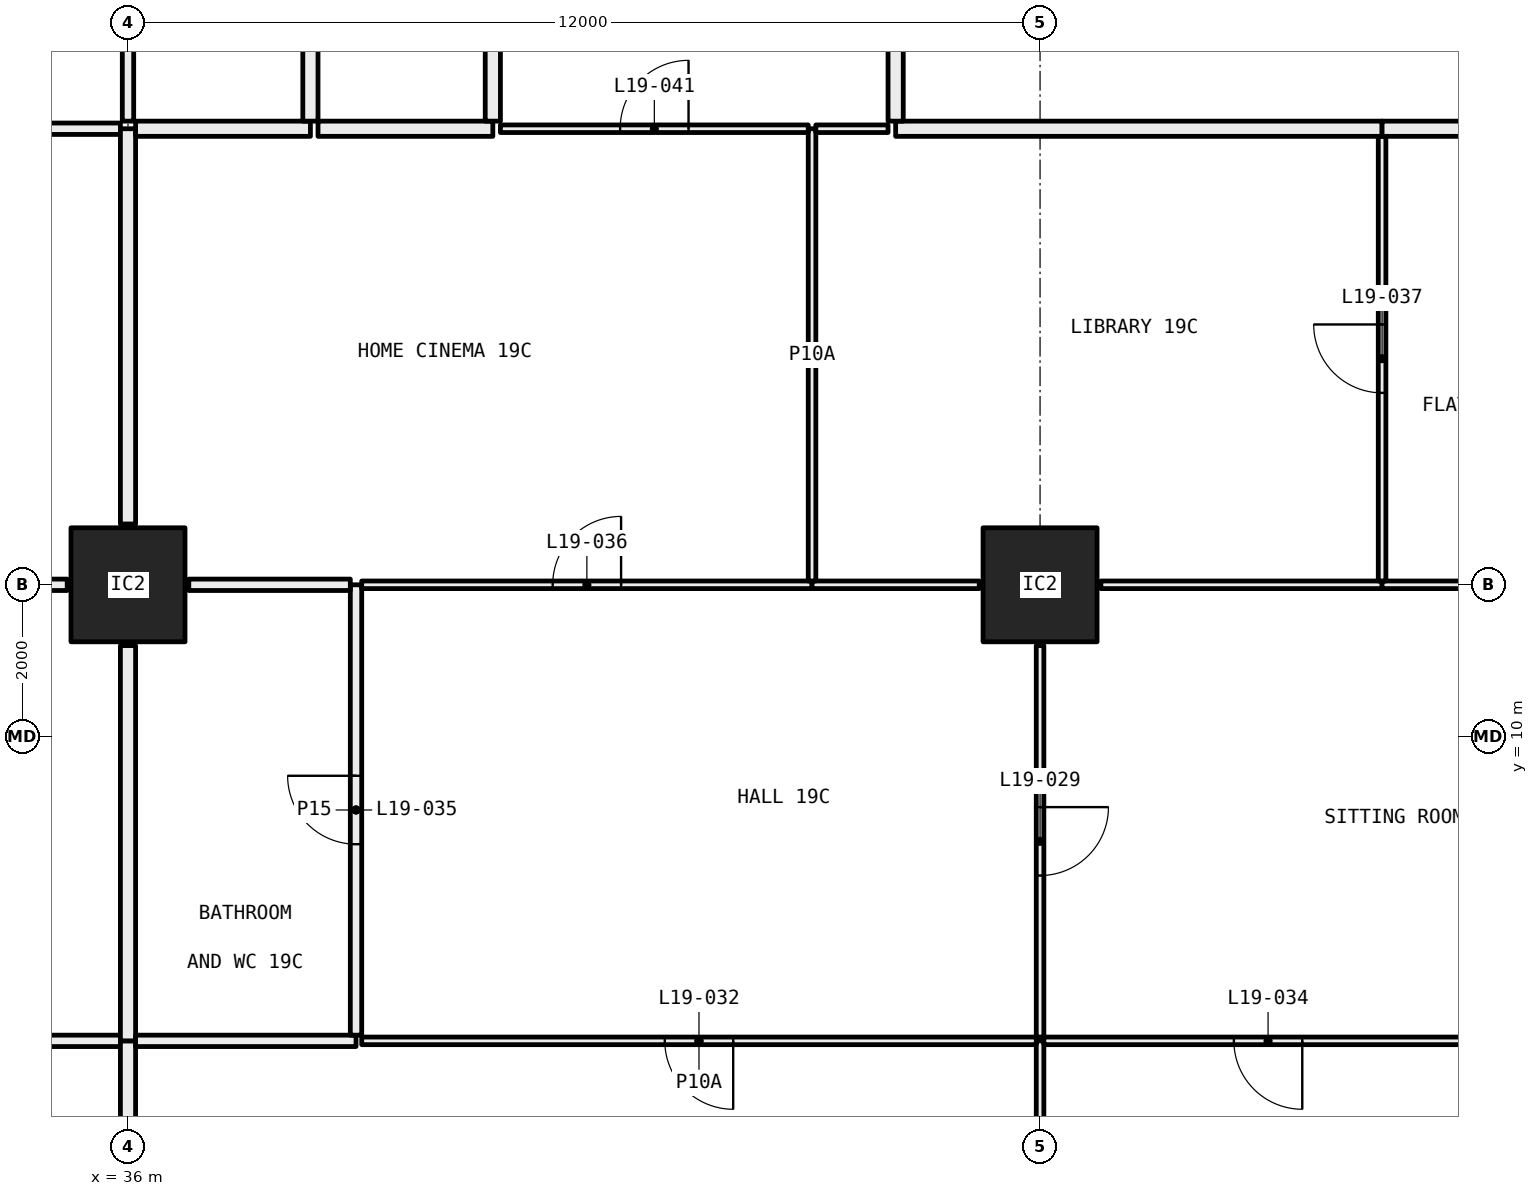
"""IFC4 building model, lengths in metres.
Left out: names, types, materials, properties, quantities, classifications, styles, units other than length and angle.
Written with IfcOpenShell. Run it as: python <this file> out.ifc"""

import sys

from ifc_helpers import new_model, si_unit, direction, frame, frame_2d, origin, origin_2d, place, context, subcontext, project, spatial, rectangle, hollow_rectangle, extrude, element, fill, save


model = new_model("IFC4")
c1 = context("Model", 3, precision=1e-05, world=origin(), true_north=direction((0.0, 1.0)))
c2 = subcontext(c1, "Body", "Model", "MODEL_VIEW")
j1 = project(units=[si_unit("LENGTHUNIT", "METRE"), si_unit("PLANEANGLEUNIT", "RADIAN")], contexts=[c1])
p1 = place(None, origin())
s1 = spatial("IfcSite", under=j1, at=p1, CompositionType="ELEMENT")
p2 = place(p1, origin())
s2 = spatial("IfcBuilding", under=s1, at=p2, CompositionType="ELEMENT")
p3 = place(p2, frame((0.0, 0.0, 78.3)))
s3 = spatial("IfcBuildingStorey", under=s2, at=p3, CompositionType="ELEMENT", Elevation=78.3)
for number, where, z_axis, x_axis in (
    (1, (36.0, 12.0, 0.0), (0.0, 0.0, 1.0), (1.0, 0.0, 0.0)),
    (2, (48.0, 12.0, 0.0), (0.0, 0.0, 1.0), (1.0, 0.0, 0.0)),
):
    element("IfcColumn", number, at=place(p3, frame(where, z_axis=z_axis, x_axis=x_axis)), inside=s3, PredefinedType="COLUMN", context=c2, shape_type="SweptSolid", body=[
        extrude(hollow_rectangle(XDim=1.5, YDim=1.5, WallThickness=0.065, at=origin_2d()), origin(), (0.0, 0.0, 1.0), 3.05),
    ])
p4 = place(p3, frame((35.9, 6.0, 0.0), z_axis=(0.0, 0.0, 1.0), x_axis=(-1.0, 0.0, 0.0)))
e3 = element("IfcWall", 3, at=p4, inside=s3, PredefinedType="PARTITIONING", context=c2, shape_type="SweptSolid", body=[
    extrude(rectangle(XDim=2.9, YDim=0.15, at=frame_2d((1.45, 0.0))), origin(), (0.0, 0.0, 1.0), 3.05),
])
p5 = place(p3, frame((36.0, 0.72, 0.0), z_axis=(0.0, 0.0, 1.0), x_axis=(0.0, 1.0, 0.0)))
e4 = element("IfcWall", 4, at=p5, inside=s3, PredefinedType="PARTITIONING", context=c2, shape_type="SweptSolid", body=[
    extrude(rectangle(XDim=5.28, YDim=0.2, at=frame_2d((2.64, 0.0))), origin(), (0.0, 0.0, 1.0), 2.45),
])
p6 = place(p3, frame((35.2, 12.0, 0.0), z_axis=(0.0, 0.0, 1.0), x_axis=(-1.0, 0.0, 0.0)))
e5 = element("IfcWall", 5, at=p6, inside=s3, PredefinedType="PARTITIONING", context=c2, shape_type="SweptSolid", body=[
    extrude(rectangle(XDim=2.125, YDim=0.15, at=frame_2d((1.062, 0.0))), origin(), (0.0, 0.0, 1.0), 2.45),
])
p7 = place(p3, frame((36.0, 6.0, 0.0), z_axis=(0.0, 0.0, 1.0), x_axis=(0.0, 1.0, 0.0)))
e6 = element("IfcWall", 6, at=p7, inside=s3, PredefinedType="PARTITIONING", context=c2, shape_type="SweptSolid", body=[
    extrude(rectangle(XDim=5.2, YDim=0.2, at=frame_2d((2.6, 0.0))), origin(), (0.0, 0.0, 1.0), 2.45),
])
p8 = place(p3, frame((35.9, 18.0, 0.0), z_axis=(0.0, 0.0, 1.0), x_axis=(-1.0, 0.0, 0.0)))
e7 = element("IfcWall", 7, at=p8, inside=s3, PredefinedType="PARTITIONING", context=c2, shape_type="SweptSolid", body=[
    extrude(rectangle(XDim=4.4, YDim=0.15, at=frame_2d((2.2, 0.0))), origin(), (0.0, 0.0, 1.0), 3.05),
])
p9 = place(p3, frame((36.0, 12.8, 0.0), z_axis=(0.0, 0.0, 1.0), x_axis=(0.0, 1.0, 0.0)))
e8 = element("IfcWall", 8, at=p9, inside=s3, PredefinedType="PARTITIONING", context=c2, shape_type="SweptSolid", body=[
    extrude(rectangle(XDim=5.2, YDim=0.2, at=frame_2d((2.6, 0.0))), origin(), (0.0, 0.0, 1.0), 2.45),
])
p10 = place(p3, frame((36.0, 18.1, 0.0), z_axis=(0.0, 0.0, 1.0), x_axis=(0.0, 1.0, 0.0)))
e9 = element("IfcWall", 9, at=p10, inside=s3, PredefinedType="PARTITIONING", context=c2, shape_type="SweptSolid", body=[
    extrude(rectangle(XDim=5.1, YDim=0.15, at=frame_2d((2.55, 0.0))), origin(), (0.0, 0.0, 1.0), 2.45),
])
p11 = place(p10, frame((2.1, 0.0, 0.0)))
e10 = element("IfcOpeningElement", 10, at=p11, cuts=e9, PredefinedType="OPENING", context=c2, shape_type="SweptSolid", body=[
    extrude(rectangle(XDim=0.9, YDim=2.1, at=frame_2d((0.45, 1.05))), frame((0.0, 0.085, 0.0), z_axis=(0.0, -1.0, 0.0), x_axis=(1.0, 0.0, 0.0)), (0.0, 0.0, 1.0), 0.17),
])
p12 = place(p3, frame((36.1, 18.0, 0.0), z_axis=(0.0, 0.0, 1.0), x_axis=(1.0, 0.0, 0.0)))
e11 = element("IfcWall", 11, at=p12, inside=s3, PredefinedType="PARTITIONING", context=c2, shape_type="SweptSolid", body=[
    extrude(rectangle(XDim=2.3, YDim=0.2, at=frame_2d((1.15, 0.0))), origin(), (0.0, 0.0, 1.0), 3.05),
])
p13 = place(p3, frame((38.4, 18.1, 0.0), z_axis=(0.0, 0.0, 1.0), x_axis=(0.0, 1.0, 0.0)))
e12 = element("IfcWall", 12, at=p13, inside=s3, PredefinedType="PARTITIONING", context=c2, shape_type="SweptSolid", body=[
    extrude(rectangle(XDim=6.2, YDim=0.2, at=frame_2d((3.1, 0.0))), origin(), (0.0, 0.0, 1.0), 2.45),
])
p14 = place(p3, frame((48.0, 0.72, 0.0), z_axis=(0.0, 0.0, 1.0), x_axis=(0.0, 1.0, 0.0)))
e13 = element("IfcWall", 13, at=p14, inside=s3, PredefinedType="PARTITIONING", context=c2, shape_type="SweptSolid", body=[
    extrude(rectangle(XDim=5.28, YDim=0.1, at=frame_2d((2.64, 0.0))), origin(), (0.0, 0.0, 1.0), 2.45),
])
p15 = place(p3, frame((39.0, 6.0, 0.0), z_axis=(0.0, 0.0, 1.0), x_axis=(-1.0, 0.0, 0.0)))
e14 = element("IfcWall", 14, at=p15, inside=s3, PredefinedType="PARTITIONING", context=c2, shape_type="SweptSolid", body=[
    extrude(rectangle(XDim=2.9, YDim=0.15, at=frame_2d((1.45, 0.0))), origin(), (0.0, 0.0, 1.0), 3.05),
])
p16 = place(p3, frame((47.95, 6.0, 0.0), z_axis=(0.0, 0.0, 1.0), x_axis=(-1.0, 0.0, 0.0)))
e15 = element("IfcWall", 15, at=p16, inside=s3, PredefinedType="PARTITIONING", context=c2, shape_type="SweptSolid", body=[
    extrude(rectangle(XDim=8.875, YDim=0.1, at=frame_2d((4.438, 0.0))), origin(), (0.0, 0.0, 1.0), 2.45),
])
p17 = place(p16, frame((3.988, 0.0, 0.0)))
e16 = element("IfcOpeningElement", 16, at=p17, cuts=e15, PredefinedType="OPENING", context=c2, shape_type="SweptSolid", body=[
    extrude(rectangle(XDim=0.9, YDim=2.1, at=frame_2d((0.45, 1.05))), frame((0.0, 0.06, 0.0), z_axis=(0.0, -1.0, 0.0), x_axis=(1.0, 0.0, 0.0)), (0.0, 0.0, 1.0), 0.12),
])
p18 = place(p3, frame((53.95, 6.0, 0.0), z_axis=(0.0, 0.0, 1.0), x_axis=(-1.0, 0.0, 0.0)))
e17 = element("IfcWall", 17, at=p18, inside=s3, PredefinedType="PARTITIONING", context=c2, shape_type="SweptSolid", body=[
    extrude(rectangle(XDim=5.9, YDim=0.1, at=frame_2d((2.95, 0.0))), origin(), (0.0, 0.0, 1.0), 2.45),
])
p19 = place(p18, frame((2.5, 0.0, 0.0)))
e18 = element("IfcOpeningElement", 18, at=p19, cuts=e17, PredefinedType="OPENING", context=c2, shape_type="SweptSolid", body=[
    extrude(rectangle(XDim=0.9, YDim=2.1, at=frame_2d((0.45, 1.05))), frame((0.0, 0.06, 0.0), z_axis=(0.0, -1.0, 0.0), x_axis=(1.0, 0.0, 0.0)), (0.0, 0.0, 1.0), 0.12),
])
p20 = place(p3, frame((39.0, 6.075, 0.0), z_axis=(0.0, 0.0, 1.0), x_axis=(0.0, 1.0, 0.0)))
e19 = element("IfcWall", 19, at=p20, inside=s3, PredefinedType="PARTITIONING", context=c2, shape_type="SweptSolid", body=[
    extrude(rectangle(XDim=5.925, YDim=0.15, at=frame_2d((2.962, 0.0))), origin(), (0.0, 0.0, 1.0), 2.45),
])
p21 = place(p20, frame((2.512, 0.0, 0.0)))
e20 = element("IfcOpeningElement", 20, at=p21, cuts=e19, PredefinedType="OPENING", context=c2, shape_type="SweptSolid", body=[
    extrude(rectangle(XDim=0.9, YDim=2.1, at=frame_2d((0.45, 1.05))), frame((0.0, 0.085, 0.0), z_axis=(0.0, -1.0, 0.0), x_axis=(1.0, 0.0, 0.0)), (0.0, 0.0, 1.0), 0.17),
])
p22 = place(p3, frame((38.925, 12.0, 0.0), z_axis=(0.0, 0.0, 1.0), x_axis=(-1.0, 0.0, 0.0)))
e21 = element("IfcWall", 21, at=p22, inside=s3, PredefinedType="PARTITIONING", context=c2, shape_type="SweptSolid", body=[
    extrude(rectangle(XDim=2.125, YDim=0.15, at=frame_2d((1.062, 0.0))), origin(), (0.0, 0.0, 1.0), 2.45),
])
p23 = place(p3, frame((48.0, 6.05, 0.0), z_axis=(0.0, 0.0, 1.0), x_axis=(0.0, 1.0, 0.0)))
e22 = element("IfcWall", 22, at=p23, inside=s3, PredefinedType="PARTITIONING", context=c2, shape_type="SweptSolid", body=[
    extrude(rectangle(XDim=5.15, YDim=0.1, at=frame_2d((2.575, 0.0))), origin(), (0.0, 0.0, 1.0), 2.45),
])
p24 = place(p23, frame((2.125, 0.0, 0.0)))
e23 = element("IfcOpeningElement", 23, at=p24, cuts=e22, PredefinedType="OPENING", context=c2, shape_type="SweptSolid", body=[
    extrude(rectangle(XDim=0.9, YDim=2.1, at=frame_2d((0.45, 1.05))), frame((0.0, 0.06, 0.0), z_axis=(0.0, -1.0, 0.0), x_axis=(1.0, 0.0, 0.0)), (0.0, 0.0, 1.0), 0.12),
])
p25 = place(p3, frame((45.0, 12.0, 0.0), z_axis=(0.0, 0.0, 1.0), x_axis=(-1.0, 0.0, 0.0)))
e24 = element("IfcWall", 24, at=p25, inside=s3, PredefinedType="PARTITIONING", context=c2, shape_type="SweptSolid", body=[
    extrude(rectangle(XDim=5.925, YDim=0.1, at=frame_2d((2.962, 0.0))), origin(), (0.0, 0.0, 1.0), 2.45),
])
p26 = place(p25, frame((2.512, 0.0, 0.0)))
e25 = element("IfcOpeningElement", 25, at=p26, cuts=e24, PredefinedType="OPENING", context=c2, shape_type="SweptSolid", body=[
    extrude(rectangle(XDim=0.9, YDim=2.1, at=frame_2d((0.45, 1.05))), frame((0.0, 0.06, 0.0), z_axis=(0.0, -1.0, 0.0), x_axis=(1.0, 0.0, 0.0)), (0.0, 0.0, 1.0), 0.12),
])
p27 = place(p3, frame((47.2, 12.0, 0.0), z_axis=(0.0, 0.0, 1.0), x_axis=(-1.0, 0.0, 0.0)))
e26 = element("IfcWall", 26, at=p27, inside=s3, PredefinedType="PARTITIONING", context=c2, shape_type="SweptSolid", body=[
    extrude(rectangle(XDim=2.2, YDim=0.1, at=frame_2d((1.1, 0.0))), origin(), (0.0, 0.0, 1.0), 2.45),
])
p28 = place(p3, frame((52.5, 12.0, 0.0), z_axis=(0.0, 0.0, 1.0), x_axis=(-1.0, 0.0, 0.0)))
e27 = element("IfcWall", 27, at=p28, inside=s3, PredefinedType="PARTITIONING", context=c2, shape_type="SweptSolid", body=[
    extrude(rectangle(XDim=3.7, YDim=0.1, at=frame_2d((1.85, 0.0))), origin(), (0.0, 0.0, 1.0), 2.45),
])
p29 = place(p3, frame((56.95, 12.0, 0.0), z_axis=(0.0, 0.0, 1.0), x_axis=(-1.0, 0.0, 0.0)))
e28 = element("IfcWall", 28, at=p29, inside=s3, PredefinedType="PARTITIONING", context=c2, shape_type="SweptSolid", body=[
    extrude(rectangle(XDim=4.45, YDim=0.1, at=frame_2d((2.225, 0.0))), origin(), (0.0, 0.0, 1.0), 2.45),
])
p30 = place(p29, frame((1.775, 0.0, 0.0)))
e29 = element("IfcOpeningElement", 29, at=p30, cuts=e28, PredefinedType="OPENING", context=c2, shape_type="SweptSolid", body=[
    extrude(rectangle(XDim=0.9, YDim=2.1, at=frame_2d((0.45, 1.05))), frame((0.0, 0.06, 0.0), z_axis=(0.0, -1.0, 0.0), x_axis=(1.0, 0.0, 0.0)), (0.0, 0.0, 1.0), 0.12),
])
p31 = place(p3, frame((45.0, 12.05, 0.0), z_axis=(0.0, 0.0, 1.0), x_axis=(0.0, 1.0, 0.0)))
e30 = element("IfcWall", 30, at=p31, inside=s3, PredefinedType="PARTITIONING", context=c2, shape_type="SweptSolid", body=[
    extrude(rectangle(XDim=5.95, YDim=0.1, at=frame_2d((2.975, 0.0))), origin(), (0.0, 0.0, 1.0), 2.45),
])
p32 = place(p3, frame((44.95, 18.0, 0.0), z_axis=(0.0, 0.0, 1.0), x_axis=(-1.0, 0.0, 0.0)))
e31 = element("IfcWall", 31, at=p32, inside=s3, PredefinedType="PARTITIONING", context=c2, shape_type="SweptSolid", body=[
    extrude(rectangle(XDim=4.05, YDim=0.1, at=frame_2d((2.025, 0.0))), origin(), (0.0, 0.0, 1.0), 3.05),
])
p33 = place(p32, frame((1.575, 0.0, 0.0)))
e32 = element("IfcOpeningElement", 32, at=p33, cuts=e31, PredefinedType="OPENING", context=c2, shape_type="SweptSolid", body=[
    extrude(rectangle(XDim=0.9, YDim=2.1, at=frame_2d((0.45, 1.05))), frame((0.0, 0.06, 0.0), z_axis=(0.0, -1.0, 0.0), x_axis=(1.0, 0.0, 0.0)), (0.0, 0.0, 1.0), 0.12),
])
p34 = place(p3, frame((40.8, 18.0, 0.0), z_axis=(0.0, 0.0, 1.0), x_axis=(-1.0, 0.0, 0.0)))
e33 = element("IfcWall", 33, at=p34, inside=s3, PredefinedType="PARTITIONING", context=c2, shape_type="SweptSolid", body=[
    extrude(rectangle(XDim=2.3, YDim=0.2, at=frame_2d((1.15, 0.0))), origin(), (0.0, 0.0, 1.0), 3.05),
])
p35 = place(p3, frame((52.5, 12.05, 0.0), z_axis=(0.0, 0.0, 1.0), x_axis=(0.0, 1.0, 0.0)))
e34 = element("IfcWall", 34, at=p35, inside=s3, PredefinedType="PARTITIONING", context=c2, shape_type="SweptSolid", body=[
    extrude(rectangle(XDim=5.85, YDim=0.1, at=frame_2d((2.925, 0.0))), origin(), (0.0, 0.0, 1.0), 2.45),
])
p36 = place(p35, frame((2.475, 0.0, 0.0)))
e35 = element("IfcOpeningElement", 35, at=p36, cuts=e34, PredefinedType="OPENING", context=c2, shape_type="SweptSolid", body=[
    extrude(rectangle(XDim=0.9, YDim=2.1, at=frame_2d((0.45, 1.05))), frame((0.0, 0.06, 0.0), z_axis=(0.0, -1.0, 0.0), x_axis=(1.0, 0.0, 0.0)), (0.0, 0.0, 1.0), 0.12),
])
p37 = place(p3, frame((46.0, 18.0, 0.0), z_axis=(0.0, 0.0, 1.0), x_axis=(-1.0, 0.0, 0.0)))
e36 = element("IfcWall", 36, at=p37, inside=s3, PredefinedType="PARTITIONING", context=c2, shape_type="SweptSolid", body=[
    extrude(rectangle(XDim=0.95, YDim=0.1, at=frame_2d((0.475, 0.0))), origin(), (0.0, 0.0, 1.0), 3.05),
])
p38 = place(p3, frame((52.5, 18.0, 0.0), z_axis=(0.0, 0.0, 1.0), x_axis=(-1.0, 0.0, 0.0)))
e37 = element("IfcWall", 37, at=p38, inside=s3, PredefinedType="PARTITIONING", context=c2, shape_type="SweptSolid", body=[
    extrude(rectangle(XDim=6.4, YDim=0.2, at=frame_2d((3.2, 0.0))), origin(), (0.0, 0.0, 1.0), 3.05),
])
p39 = place(p3, frame((57.0, 18.0, 0.0), z_axis=(0.0, 0.0, 1.0), x_axis=(-1.0, 0.0, 0.0)))
e38 = element("IfcWall", 38, at=p39, inside=s3, PredefinedType="PARTITIONING", context=c2, shape_type="SweptSolid", body=[
    extrude(rectangle(XDim=4.5, YDim=0.2, at=frame_2d((2.25, 0.0))), origin(), (0.0, 0.0, 1.0), 3.05),
])
p40 = place(p39, frame((1.75, 0.0, 0.0)))
e39 = element("IfcOpeningElement", 39, at=p40, cuts=e38, PredefinedType="OPENING", context=c2, shape_type="SweptSolid", body=[
    extrude(rectangle(XDim=1.0, YDim=2.1, at=frame_2d((0.5, 1.05))), frame((0.0, 0.11, 0.0), z_axis=(0.0, -1.0, 0.0), x_axis=(1.0, 0.0, 0.0)), (0.0, 0.0, 1.0), 0.22),
])
p41 = place(p3, frame((40.8, 23.9, 0.0), z_axis=(0.0, 0.0, 1.0), x_axis=(0.0, -1.0, 0.0)))
e40 = element("IfcWall", 40, at=p41, inside=s3, PredefinedType="PARTITIONING", context=c2, shape_type="SweptSolid", body=[
    extrude(rectangle(XDim=5.8, YDim=0.2, at=frame_2d((2.9, 0.0))), origin(), (0.0, 0.0, 1.0), 3.05),
])
p42 = place(p3, frame((46.1, 18.1, 0.0), z_axis=(0.0, 0.0, 1.0), x_axis=(0.0, 1.0, 0.0)))
e41 = element("IfcWall", 41, at=p42, inside=s3, PredefinedType="PARTITIONING", context=c2, shape_type="SweptSolid", body=[
    extrude(rectangle(XDim=6.2, YDim=0.2, at=frame_2d((3.1, 0.0))), origin(), (0.0, 0.0, 1.0), 2.45),
])
p43 = place(p24, frame((0.9, 0.0, 0.0), x_axis=(-1.0, 0.0, 0.0)))
e42 = element("IfcDoor", 42, at=p43, inside=s3, OperationType="SINGLE_SWING_RIGHT", PredefinedType="DOOR", context=c2, shape_type="SweptSolid", body=[
    extrude(rectangle(XDim=0.9, YDim=2.1, at=frame_2d((0.45, 1.05))), frame((0.0, 0.025, 0.0), z_axis=(0.0, -1.0, 0.0), x_axis=(1.0, 0.0, 0.0)), (0.0, 0.0, 1.0), 0.05),
])
fill(e23, e42)
p44 = place(p17, origin())
e43 = element("IfcDoor", 43, at=p44, inside=s3, OperationType="SINGLE_SWING_RIGHT", PredefinedType="DOOR", context=c2, shape_type="SweptSolid", body=[
    extrude(rectangle(XDim=0.9, YDim=2.1, at=frame_2d((0.45, 1.05))), frame((0.0, 0.025, 0.0), z_axis=(0.0, -1.0, 0.0), x_axis=(1.0, 0.0, 0.0)), (0.0, 0.0, 1.0), 0.05),
])
fill(e16, e43)
p45 = place(p19, origin())
e44 = element("IfcDoor", 44, at=p45, inside=s3, OperationType="SINGLE_SWING_RIGHT", PredefinedType="DOOR", context=c2, shape_type="SweptSolid", body=[
    extrude(rectangle(XDim=0.9, YDim=2.1, at=frame_2d((0.45, 1.05))), frame((0.0, 0.025, 0.0), z_axis=(0.0, -1.0, 0.0), x_axis=(1.0, 0.0, 0.0)), (0.0, 0.0, 1.0), 0.05),
])
fill(e18, e44)
p46 = place(p21, origin())
e45 = element("IfcDoor", 45, at=p46, inside=s3, OperationType="SINGLE_SWING_LEFT", PredefinedType="DOOR", context=c2, shape_type="SweptSolid", body=[
    extrude(rectangle(XDim=0.9, YDim=2.1, at=frame_2d((0.45, 1.05))), frame((0.0, 0.025, 0.0), z_axis=(0.0, -1.0, 0.0), x_axis=(1.0, 0.0, 0.0)), (0.0, 0.0, 1.0), 0.05),
])
fill(e20, e45)
p47 = place(p26, frame((0.9, 0.0, 0.0), x_axis=(-1.0, 0.0, 0.0)))
e46 = element("IfcDoor", 46, at=p47, inside=s3, OperationType="SINGLE_SWING_LEFT", PredefinedType="DOOR", context=c2, shape_type="SweptSolid", body=[
    extrude(rectangle(XDim=0.9, YDim=2.1, at=frame_2d((0.45, 1.05))), frame((0.0, 0.025, 0.0), z_axis=(0.0, -1.0, 0.0), x_axis=(1.0, 0.0, 0.0)), (0.0, 0.0, 1.0), 0.05),
])
fill(e25, e46)
p48 = place(p36, origin())
e47 = element("IfcDoor", 47, at=p48, inside=s3, OperationType="SINGLE_SWING_LEFT", PredefinedType="DOOR", context=c2, shape_type="SweptSolid", body=[
    extrude(rectangle(XDim=0.9, YDim=2.1, at=frame_2d((0.45, 1.05))), frame((0.0, 0.025, 0.0), z_axis=(0.0, -1.0, 0.0), x_axis=(1.0, 0.0, 0.0)), (0.0, 0.0, 1.0), 0.05),
])
fill(e35, e47)
p49 = place(p33, frame((0.9, 0.0, 0.0), x_axis=(-1.0, 0.0, 0.0)))
e48 = element("IfcDoor", 48, at=p49, inside=s3, OperationType="SINGLE_SWING_LEFT", PredefinedType="DOOR", context=c2, shape_type="SweptSolid", body=[
    extrude(rectangle(XDim=0.9, YDim=2.1, at=frame_2d((0.45, 1.05))), frame((0.0, 0.025, 0.0), z_axis=(0.0, -1.0, 0.0), x_axis=(1.0, 0.0, 0.0)), (0.0, 0.0, 1.0), 0.05),
])
fill(e32, e48)
save(model, sys.argv[1])
